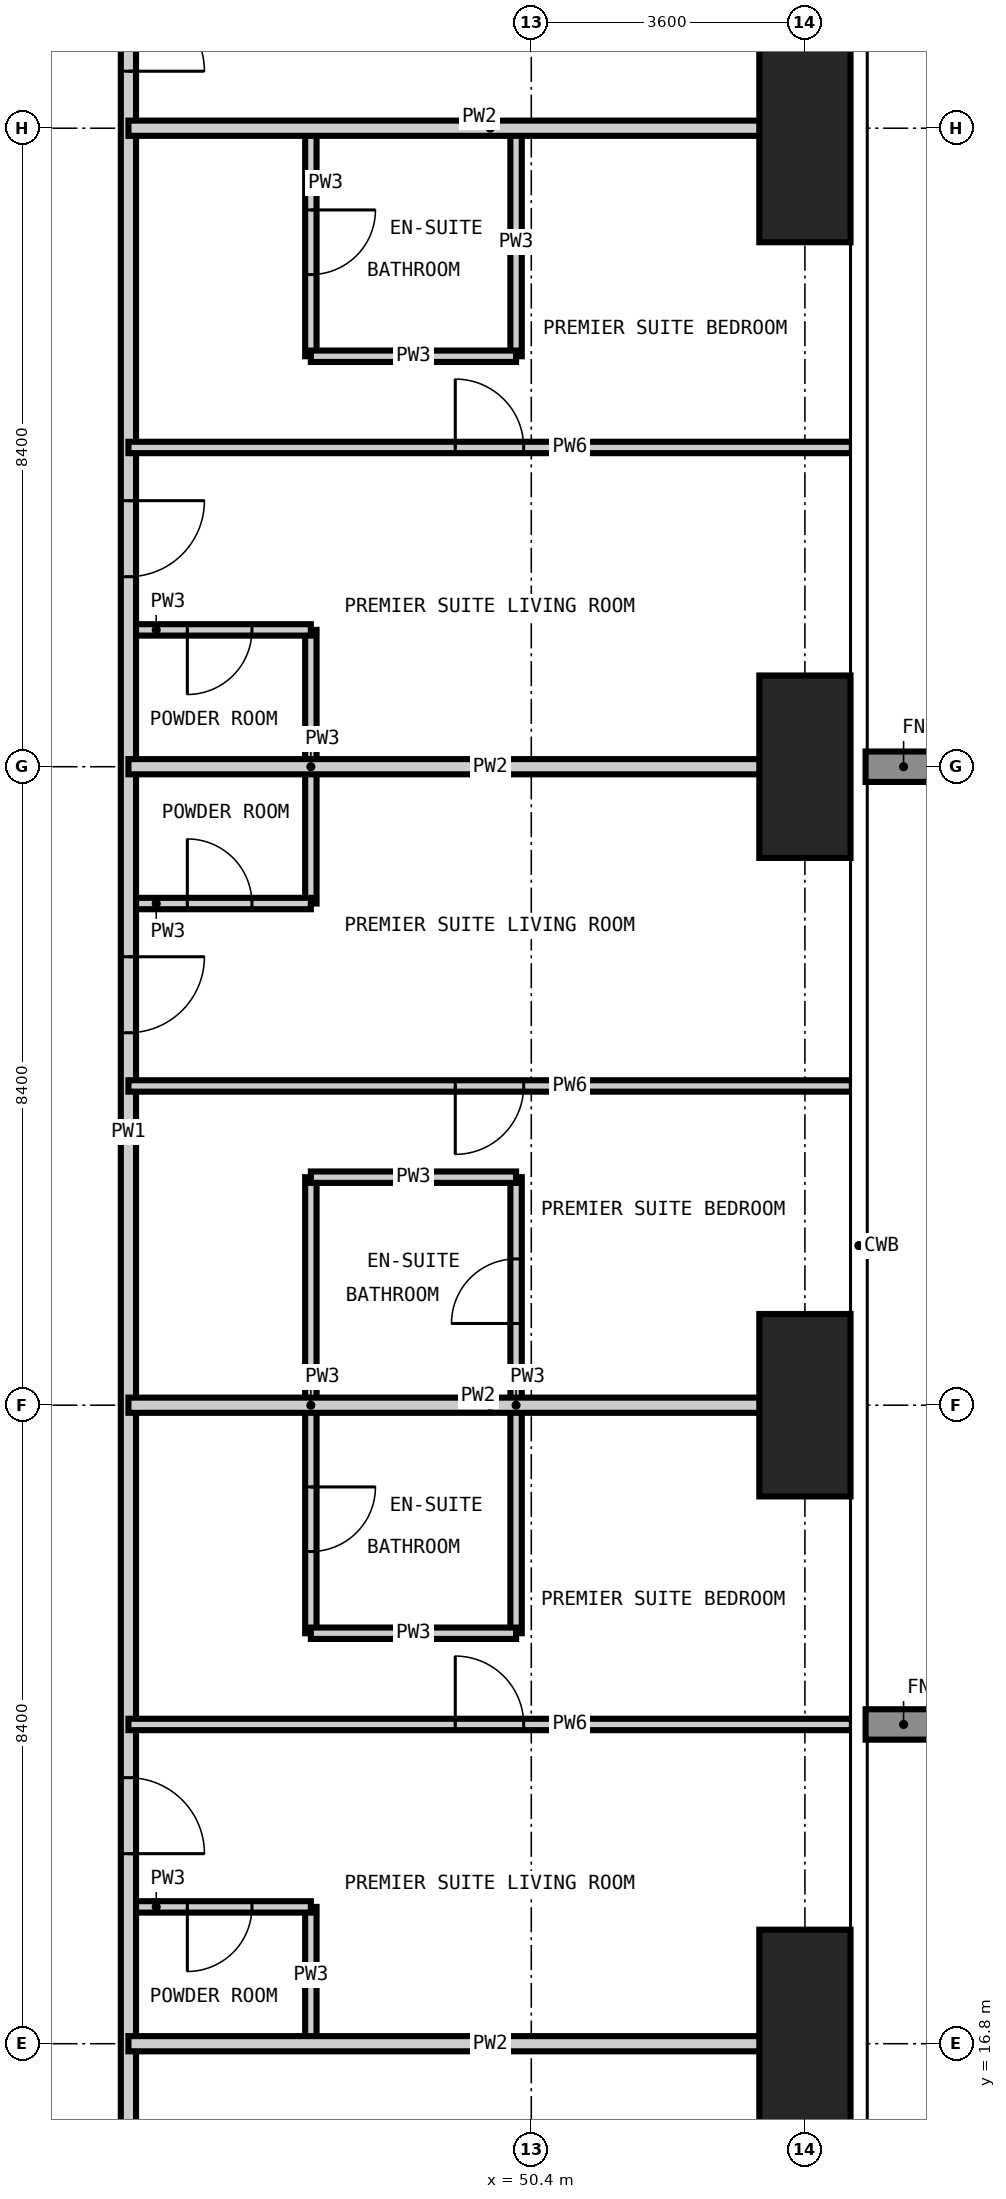
"""IFC4 building model, lengths in metres.
Left out: names, types, materials, properties, quantities, classifications, styles, units other than length and angle.
Written with IfcOpenShell. Run it as: python <this file> out.ifc"""

import sys

from ifc_helpers import new_model, si_unit, direction, frame, frame_2d, origin, origin_2d, place, context, subcontext, project, spatial, rectangle, extrude, element, fill, save


model = new_model("IFC4")
c1 = context("Model", 3, precision=1e-05, world=origin(), true_north=direction((0.0, 1.0)))
c2 = subcontext(c1, "Body", "Model", "MODEL_VIEW")
j1 = project(units=[si_unit("LENGTHUNIT", "METRE"), si_unit("PLANEANGLEUNIT", "RADIAN")], contexts=[c1])
p1 = place(None, origin())
s1 = spatial("IfcSite", under=j1, at=p1, CompositionType="ELEMENT")
p2 = place(p1, origin())
s2 = spatial("IfcBuilding", under=s1, at=p2, CompositionType="ELEMENT")
p3 = place(p2, frame((0.0, 0.0, 144.0)))
s3 = spatial("IfcBuildingStorey", under=s2, at=p3, CompositionType="ELEMENT", Elevation=144.0)
p4 = place(p3, frame((54.0, 16.8, -0.35), z_axis=(0.0, 0.0, 1.0), x_axis=(1.0, 0.0, 0.0)))
e1 = element("IfcColumn", 1, at=p4, inside=s3, PredefinedType="COLUMN", context=c2, shape_type="SweptSolid", body=[
    extrude(rectangle(XDim=1.2, YDim=3.0, at=origin_2d()), origin(), (0.0, 0.0, 1.0), 3.6),
])
for number, where, z_axis, x_axis in (
    (2, (54.0, 25.2, -0.35), (0.0, 0.0, 1.0), (1.0, 0.0, 0.0)),
    (3, (54.0, 33.6, -0.35), (0.0, 0.0, 1.0), (1.0, 0.0, 0.0)),
):
    element("IfcColumn", number, at=place(p3, frame(where, z_axis=z_axis, x_axis=x_axis)), inside=s3, PredefinedType="COLUMN", context=c2, shape_type="SweptSolid", body=[
        extrude(rectangle(XDim=1.2, YDim=2.4, at=origin_2d()), origin(), (0.0, 0.0, 1.0), 3.6),
    ])
p5 = place(p3, frame((54.0, 42.0, -0.35), z_axis=(0.0, 0.0, 1.0), x_axis=(1.0, 0.0, 0.0)))
e4 = element("IfcColumn", 4, at=p5, inside=s3, PredefinedType="COLUMN", context=c2, shape_type="SweptSolid", body=[
    extrude(rectangle(XDim=1.2, YDim=3.0, at=origin_2d()), origin(), (0.0, 0.0, 1.0), 3.6),
])
p6 = place(p3, frame((47.5, 16.8, 0.0), z_axis=(0.0, 0.0, 1.0), x_axis=(0.0, 1.0, 0.0)))
e5 = element("IfcWall", 5, at=p6, inside=s3, PredefinedType="PARTITIONING", context=c2, shape_type="SweptSolid", body=[
    extrude(rectangle(XDim=1.8, YDim=0.15, at=frame_2d((0.9, 0.0))), origin(), (0.0, 0.0, 1.0), 3.25),
])
p7 = place(p3, frame((47.5, 22.2, 0.0), z_axis=(0.0, 0.0, 1.0), x_axis=(0.0, 1.0, 0.0)))
e6 = element("IfcWall", 6, at=p7, inside=s3, PredefinedType="PARTITIONING", context=c2, shape_type="SweptSolid", body=[
    extrude(rectangle(XDim=6.0, YDim=0.15, at=frame_2d((3.0, 0.0))), origin(), (0.0, 0.0, 1.0), 3.25),
])
p8 = place(p7, frame((1.075, 0.0, 0.0)))
e7 = element("IfcOpeningElement", 7, at=p8, cuts=e6, PredefinedType="OPENING", context=c2, shape_type="SweptSolid", body=[
    extrude(rectangle(XDim=0.85, YDim=2.1, at=frame_2d((0.425, 1.05))), frame((0.0, 0.085, 0.0), z_axis=(0.0, -1.0, 0.0), x_axis=(1.0, 0.0, 0.0)), (0.0, 0.0, 1.0), 0.17),
])
p9 = place(p3, frame((47.5, 31.8, 0.0), z_axis=(0.0, 0.0, 1.0), x_axis=(0.0, 1.0, 0.0)))
e8 = element("IfcWall", 8, at=p9, inside=s3, PredefinedType="PARTITIONING", context=c2, shape_type="SweptSolid", body=[
    extrude(rectangle(XDim=3.6, YDim=0.15, at=frame_2d((1.8, 0.0))), origin(), (0.0, 0.0, 1.0), 3.25),
])
p10 = place(p3, frame((47.5, 39.0, 0.0), z_axis=(0.0, 0.0, 1.0), x_axis=(0.0, 1.0, 0.0)))
e9 = element("IfcWall", 9, at=p10, inside=s3, PredefinedType="PARTITIONING", context=c2, shape_type="SweptSolid", body=[
    extrude(rectangle(XDim=3.0, YDim=0.15, at=frame_2d((1.5, 0.0))), origin(), (0.0, 0.0, 1.0), 3.25),
])
p11 = place(p10, frame((1.075, 0.0, 0.0)))
e10 = element("IfcOpeningElement", 10, at=p11, cuts=e9, PredefinedType="OPENING", context=c2, shape_type="SweptSolid", body=[
    extrude(rectangle(XDim=0.85, YDim=2.1, at=frame_2d((0.425, 1.05))), frame((0.0, 0.085, 0.0), z_axis=(0.0, -1.0, 0.0), x_axis=(1.0, 0.0, 0.0)), (0.0, 0.0, 1.0), 0.17),
])
p12 = place(p3, frame((50.2, 22.2, 0.0), z_axis=(0.0, 0.0, 1.0), x_axis=(0.0, 1.0, 0.0)))
e11 = element("IfcWall", 11, at=p12, inside=s3, PredefinedType="PARTITIONING", context=c2, shape_type="SweptSolid", body=[
    extrude(rectangle(XDim=6.0, YDim=0.15, at=frame_2d((3.0, 0.0))), origin(), (0.0, 0.0, 1.0), 3.25),
])
p13 = place(p12, frame((4.075, 0.0, 0.0)))
e12 = element("IfcOpeningElement", 12, at=p13, cuts=e11, PredefinedType="OPENING", context=c2, shape_type="SweptSolid", body=[
    extrude(rectangle(XDim=0.85, YDim=2.1, at=frame_2d((0.425, 1.05))), frame((0.0, 0.085, 0.0), z_axis=(0.0, -1.0, 0.0), x_axis=(1.0, 0.0, 0.0)), (0.0, 0.0, 1.0), 0.17),
])
p14 = place(p3, frame((50.2, 39.0, 0.0), z_axis=(0.0, 0.0, 1.0), x_axis=(0.0, 1.0, 0.0)))
e13 = element("IfcWall", 13, at=p14, inside=s3, PredefinedType="PARTITIONING", context=c2, shape_type="SweptSolid", body=[
    extrude(rectangle(XDim=3.0, YDim=0.15, at=frame_2d((1.5, 0.0))), origin(), (0.0, 0.0, 1.0), 3.25),
])
p15 = place(p3, frame((45.1, 18.6, 0.0), z_axis=(0.0, 0.0, 1.0), x_axis=(1.0, 0.0, 0.0)))
e14 = element("IfcWall", 14, at=p15, inside=s3, PredefinedType="PARTITIONING", context=c2, shape_type="SweptSolid", body=[
    extrude(rectangle(XDim=2.4, YDim=0.15, at=frame_2d((1.2, 0.0))), origin(), (0.0, 0.0, 1.0), 3.25),
])
p16 = place(p15, frame((0.775, 0.0, 0.0)))
e15 = element("IfcOpeningElement", 15, at=p16, cuts=e14, PredefinedType="OPENING", context=c2, shape_type="SweptSolid", body=[
    extrude(rectangle(XDim=0.85, YDim=2.1, at=frame_2d((0.425, 1.05))), frame((0.0, 0.085, 0.0), z_axis=(0.0, -1.0, 0.0), x_axis=(1.0, 0.0, 0.0)), (0.0, 0.0, 1.0), 0.17),
])
for number, where, z_axis, x_axis in (
    (16, (47.5, 22.2, 0.0), (0.0, 0.0, 1.0), (1.0, 0.0, 0.0)),
    (17, (47.5, 28.2, 0.0), (0.0, 0.0, 1.0), (1.0, 0.0, 0.0)),
):
    element("IfcWall", number, at=place(p3, frame(where, z_axis=z_axis, x_axis=x_axis)), inside=s3, PredefinedType="PARTITIONING", context=c2, shape_type="SweptSolid", body=[
        extrude(rectangle(XDim=2.7, YDim=0.15, at=frame_2d((1.35, 0.0))), origin(), (0.0, 0.0, 1.0), 3.25),
    ])
p17 = place(p3, frame((45.1, 31.8, 0.0), z_axis=(0.0, 0.0, 1.0), x_axis=(1.0, 0.0, 0.0)))
e18 = element("IfcWall", 18, at=p17, inside=s3, PredefinedType="PARTITIONING", context=c2, shape_type="SweptSolid", body=[
    extrude(rectangle(XDim=2.4, YDim=0.15, at=frame_2d((1.2, 0.0))), origin(), (0.0, 0.0, 1.0), 3.25),
])
p18 = place(p17, frame((0.775, 0.0, 0.0)))
e19 = element("IfcOpeningElement", 19, at=p18, cuts=e18, PredefinedType="OPENING", context=c2, shape_type="SweptSolid", body=[
    extrude(rectangle(XDim=0.85, YDim=2.1, at=frame_2d((0.425, 1.05))), frame((0.0, 0.085, 0.0), z_axis=(0.0, -1.0, 0.0), x_axis=(1.0, 0.0, 0.0)), (0.0, 0.0, 1.0), 0.17),
])
p19 = place(p3, frame((45.1, 35.4, 0.0), z_axis=(0.0, 0.0, 1.0), x_axis=(1.0, 0.0, 0.0)))
e20 = element("IfcWall", 20, at=p19, inside=s3, PredefinedType="PARTITIONING", context=c2, shape_type="SweptSolid", body=[
    extrude(rectangle(XDim=2.4, YDim=0.15, at=frame_2d((1.2, 0.0))), origin(), (0.0, 0.0, 1.0), 3.25),
])
p20 = place(p19, frame((0.775, 0.0, 0.0)))
e21 = element("IfcOpeningElement", 21, at=p20, cuts=e20, PredefinedType="OPENING", context=c2, shape_type="SweptSolid", body=[
    extrude(rectangle(XDim=0.85, YDim=2.1, at=frame_2d((0.425, 1.05))), frame((0.0, 0.085, 0.0), z_axis=(0.0, -1.0, 0.0), x_axis=(1.0, 0.0, 0.0)), (0.0, 0.0, 1.0), 0.17),
])
p21 = place(p3, frame((47.5, 39.0, 0.0), z_axis=(0.0, 0.0, 1.0), x_axis=(1.0, 0.0, 0.0)))
e22 = element("IfcWall", 22, at=p21, inside=s3, PredefinedType="PARTITIONING", context=c2, shape_type="SweptSolid", body=[
    extrude(rectangle(XDim=2.7, YDim=0.15, at=frame_2d((1.35, 0.0))), origin(), (0.0, 0.0, 1.0), 3.25),
])
p22 = place(p3, frame((45.1, 44.5, 0.0), z_axis=(0.0, 0.0, 1.0), x_axis=(0.0, -1.0, 0.0)))
e23 = element("IfcWall", 23, at=p22, inside=s3, PredefinedType="PARTITIONING", context=c2, shape_type="SweptSolid", body=[
    extrude(rectangle(XDim=31.4, YDim=0.2, at=frame_2d((15.7, 0.0))), origin(), (0.0, 0.0, 1.0), 3.25),
])
p23 = place(p22, frame((24.2, 0.0, 0.0)))
e24 = element("IfcOpeningElement", 24, at=p23, cuts=e23, PredefinedType="OPENING", context=c2, shape_type="SweptSolid", body=[
    extrude(rectangle(XDim=1.0, YDim=2.2, at=frame_2d((0.5, 1.1))), frame((0.0, 0.11, 0.0), z_axis=(0.0, -1.0, 0.0), x_axis=(1.0, 0.0, 0.0)), (0.0, 0.0, 1.0), 0.22),
])
p24 = place(p22, frame((13.4, 0.0, 0.0)))
e25 = element("IfcOpeningElement", 25, at=p24, cuts=e23, PredefinedType="OPENING", context=c2, shape_type="SweptSolid", body=[
    extrude(rectangle(XDim=1.0, YDim=2.2, at=frame_2d((0.5, 1.1))), frame((0.0, 0.11, 0.0), z_axis=(0.0, -1.0, 0.0), x_axis=(1.0, 0.0, 0.0)), (0.0, 0.0, 1.0), 0.22),
])
p25 = place(p22, frame((7.4, 0.0, 0.0)))
e26 = element("IfcOpeningElement", 26, at=p25, cuts=e23, PredefinedType="OPENING", context=c2, shape_type="SweptSolid", body=[
    extrude(rectangle(XDim=1.0, YDim=2.2, at=frame_2d((0.5, 1.1))), frame((0.0, 0.11, 0.0), z_axis=(0.0, -1.0, 0.0), x_axis=(1.0, 0.0, 0.0)), (0.0, 0.0, 1.0), 0.22),
])
p26 = place(p22, frame((29.05, 0.0, 0.0)))
e27 = element("IfcOpeningElement", 27, at=p26, cuts=e23, PredefinedType="OPENING", context=c2, shape_type="SweptSolid", body=[
    extrude(rectangle(XDim=1.0, YDim=2.2, at=frame_2d((0.5, 1.1))), frame((0.0, 0.11, 0.0), z_axis=(0.0, -1.0, 0.0), x_axis=(1.0, 0.0, 0.0)), (0.0, 0.0, 1.0), 0.22),
])
p27 = place(p22, frame((0.75, 0.0, 0.0)))
e28 = element("IfcOpeningElement", 28, at=p27, cuts=e23, PredefinedType="OPENING", context=c2, shape_type="SweptSolid", body=[
    extrude(rectangle(XDim=1.0, YDim=2.2, at=frame_2d((0.5, 1.1))), frame((0.0, 0.11, 0.0), z_axis=(0.0, -1.0, 0.0), x_axis=(1.0, 0.0, 0.0)), (0.0, 0.0, 1.0), 0.22),
])
for number, where, z_axis, x_axis in (
    (29, (45.1, 16.8, 0.0), (0.0, 0.0, 1.0), (1.0, 0.0, 0.0)),
    (30, (45.1, 25.2, 0.0), (0.0, 0.0, 1.0), (1.0, 0.0, 0.0)),
    (31, (45.1, 33.6, 0.0), (0.0, 0.0, 1.0), (1.0, 0.0, 0.0)),
    (32, (45.1, 42.0, 0.0), (0.0, 0.0, 1.0), (1.0, 0.0, 0.0)),
):
    element("IfcWall", number, at=place(p3, frame(where, z_axis=z_axis, x_axis=x_axis)), inside=s3, PredefinedType="PARTITIONING", context=c2, shape_type="SweptSolid", body=[
        extrude(rectangle(XDim=9.518, YDim=0.2, at=frame_2d((4.759, 0.0))), origin(), (0.0, 0.0, 1.0), 3.25),
    ])
p28 = place(p3, frame((45.1, 21.0, 0.0), z_axis=(0.0, 0.0, 1.0), x_axis=(1.0, 0.0, 0.0)))
e33 = element("IfcWall", 33, at=p28, inside=s3, PredefinedType="PARTITIONING", context=c2, shape_type="SweptSolid", body=[
    extrude(rectangle(XDim=9.518, YDim=0.15, at=frame_2d((4.759, 0.0))), origin(), (0.0, 0.0, 1.0), 3.25),
])
p29 = place(p28, frame((4.3, 0.0, 0.0)))
e34 = element("IfcOpeningElement", 34, at=p29, cuts=e33, PredefinedType="OPENING", context=c2, shape_type="SweptSolid", body=[
    extrude(rectangle(XDim=0.9, YDim=2.1, at=frame_2d((0.45, 1.05))), frame((0.0, 0.085, 0.0), z_axis=(0.0, -1.0, 0.0), x_axis=(1.0, 0.0, 0.0)), (0.0, 0.0, 1.0), 0.17),
])
p30 = place(p3, frame((45.1, 29.4, 0.0), z_axis=(0.0, 0.0, 1.0), x_axis=(1.0, 0.0, 0.0)))
e35 = element("IfcWall", 35, at=p30, inside=s3, PredefinedType="PARTITIONING", context=c2, shape_type="SweptSolid", body=[
    extrude(rectangle(XDim=9.518, YDim=0.15, at=frame_2d((4.759, 0.0))), origin(), (0.0, 0.0, 1.0), 3.25),
])
p31 = place(p30, frame((4.3, 0.0, 0.0)))
e36 = element("IfcOpeningElement", 36, at=p31, cuts=e35, PredefinedType="OPENING", context=c2, shape_type="SweptSolid", body=[
    extrude(rectangle(XDim=0.9, YDim=2.1, at=frame_2d((0.45, 1.05))), frame((0.0, 0.085, 0.0), z_axis=(0.0, -1.0, 0.0), x_axis=(1.0, 0.0, 0.0)), (0.0, 0.0, 1.0), 0.17),
])
p32 = place(p3, frame((45.1, 37.8, 0.0), z_axis=(0.0, 0.0, 1.0), x_axis=(1.0, 0.0, 0.0)))
e37 = element("IfcWall", 37, at=p32, inside=s3, PredefinedType="PARTITIONING", context=c2, shape_type="SweptSolid", body=[
    extrude(rectangle(XDim=9.518, YDim=0.15, at=frame_2d((4.759, 0.0))), origin(), (0.0, 0.0, 1.0), 3.25),
])
p33 = place(p32, frame((4.3, 0.0, 0.0)))
e38 = element("IfcOpeningElement", 38, at=p33, cuts=e37, PredefinedType="OPENING", context=c2, shape_type="SweptSolid", body=[
    extrude(rectangle(XDim=0.9, YDim=2.1, at=frame_2d((0.45, 1.05))), frame((0.0, 0.085, 0.0), z_axis=(0.0, -1.0, 0.0), x_axis=(1.0, 0.0, 0.0)), (0.0, 0.0, 1.0), 0.17),
])
p34 = place(p23, origin())
e39 = element("IfcDoor", 39, at=p34, inside=s3, OperationType="SINGLE_SWING_RIGHT", PredefinedType="DOOR", context=c2, shape_type="SweptSolid", body=[
    extrude(rectangle(XDim=1.0, YDim=2.2, at=frame_2d((0.5, 1.1))), frame((0.0, 0.025, 0.0), z_axis=(0.0, -1.0, 0.0), x_axis=(1.0, 0.0, 0.0)), (0.0, 0.0, 1.0), 0.05),
])
fill(e24, e39)
p35 = place(p16, frame((0.85, 0.0, 0.0), z_axis=(0.0, 0.0, 1.0), x_axis=(-1.0, 0.0, 0.0)))
e40 = element("IfcDoor", 40, at=p35, inside=s3, OperationType="SINGLE_SWING_RIGHT", PredefinedType="DOOR", context=c2, shape_type="SweptSolid", body=[
    extrude(rectangle(XDim=0.85, YDim=2.1, at=frame_2d((0.425, 1.05))), frame((0.0, 0.025, 0.0), z_axis=(0.0, -1.0, 0.0), x_axis=(1.0, 0.0, 0.0)), (0.0, 0.0, 1.0), 0.05),
])
fill(e15, e40)
p36 = place(p29, origin())
e41 = element("IfcDoor", 41, at=p36, inside=s3, OperationType="SINGLE_SWING_LEFT", PredefinedType="DOOR", context=c2, shape_type="SweptSolid", body=[
    extrude(rectangle(XDim=0.9, YDim=2.1, at=frame_2d((0.45, 1.05))), frame((0.0, 0.025, 0.0), z_axis=(0.0, -1.0, 0.0), x_axis=(1.0, 0.0, 0.0)), (0.0, 0.0, 1.0), 0.05),
])
fill(e34, e41)
p37 = place(p8, frame((0.85, 0.0, 0.0), z_axis=(0.0, 0.0, 1.0), x_axis=(-1.0, 0.0, 0.0)))
e42 = element("IfcDoor", 42, at=p37, inside=s3, OperationType="SINGLE_SWING_LEFT", PredefinedType="DOOR", context=c2, shape_type="SweptSolid", body=[
    extrude(rectangle(XDim=0.85, YDim=2.1, at=frame_2d((0.425, 1.05))), frame((0.0, 0.025, 0.0), z_axis=(0.0, -1.0, 0.0), x_axis=(1.0, 0.0, 0.0)), (0.0, 0.0, 1.0), 0.05),
])
fill(e7, e42)
p38 = place(p24, origin())
e43 = element("IfcDoor", 43, at=p38, inside=s3, OperationType="SINGLE_SWING_LEFT", PredefinedType="DOOR", context=c2, shape_type="SweptSolid", body=[
    extrude(rectangle(XDim=1.0, YDim=2.2, at=frame_2d((0.5, 1.1))), frame((0.0, 0.025, 0.0), z_axis=(0.0, -1.0, 0.0), x_axis=(1.0, 0.0, 0.0)), (0.0, 0.0, 1.0), 0.05),
])
fill(e25, e43)
p39 = place(p18, origin())
e44 = element("IfcDoor", 44, at=p39, inside=s3, OperationType="SINGLE_SWING_LEFT", PredefinedType="DOOR", context=c2, shape_type="SweptSolid", body=[
    extrude(rectangle(XDim=0.85, YDim=2.1, at=frame_2d((0.425, 1.05))), frame((0.0, 0.025, 0.0), z_axis=(0.0, -1.0, 0.0), x_axis=(1.0, 0.0, 0.0)), (0.0, 0.0, 1.0), 0.05),
])
fill(e19, e44)
p40 = place(p31, frame((0.9, 0.0, 0.0), z_axis=(0.0, 0.0, 1.0), x_axis=(-1.0, 0.0, 0.0)))
e45 = element("IfcDoor", 45, at=p40, inside=s3, OperationType="SINGLE_SWING_RIGHT", PredefinedType="DOOR", context=c2, shape_type="SweptSolid", body=[
    extrude(rectangle(XDim=0.9, YDim=2.1, at=frame_2d((0.45, 1.05))), frame((0.0, 0.025, 0.0), z_axis=(0.0, -1.0, 0.0), x_axis=(1.0, 0.0, 0.0)), (0.0, 0.0, 1.0), 0.05),
])
fill(e36, e45)
p41 = place(p13, origin())
e46 = element("IfcDoor", 46, at=p41, inside=s3, OperationType="SINGLE_SWING_LEFT", PredefinedType="DOOR", context=c2, shape_type="SweptSolid", body=[
    extrude(rectangle(XDim=0.85, YDim=2.1, at=frame_2d((0.425, 1.05))), frame((0.0, 0.025, 0.0), z_axis=(0.0, -1.0, 0.0), x_axis=(1.0, 0.0, 0.0)), (0.0, 0.0, 1.0), 0.05),
])
fill(e12, e46)
p42 = place(p25, origin())
e47 = element("IfcDoor", 47, at=p42, inside=s3, OperationType="SINGLE_SWING_LEFT", PredefinedType="DOOR", context=c2, shape_type="SweptSolid", body=[
    extrude(rectangle(XDim=1.0, YDim=2.2, at=frame_2d((0.5, 1.1))), frame((0.0, 0.025, 0.0), z_axis=(0.0, -1.0, 0.0), x_axis=(1.0, 0.0, 0.0)), (0.0, 0.0, 1.0), 0.05),
])
fill(e26, e47)
p43 = place(p20, frame((0.85, 0.0, 0.0), z_axis=(0.0, 0.0, 1.0), x_axis=(-1.0, 0.0, 0.0)))
e48 = element("IfcDoor", 48, at=p43, inside=s3, OperationType="SINGLE_SWING_RIGHT", PredefinedType="DOOR", context=c2, shape_type="SweptSolid", body=[
    extrude(rectangle(XDim=0.85, YDim=2.1, at=frame_2d((0.425, 1.05))), frame((0.0, 0.025, 0.0), z_axis=(0.0, -1.0, 0.0), x_axis=(1.0, 0.0, 0.0)), (0.0, 0.0, 1.0), 0.05),
])
fill(e21, e48)
p44 = place(p33, origin())
e49 = element("IfcDoor", 49, at=p44, inside=s3, OperationType="SINGLE_SWING_LEFT", PredefinedType="DOOR", context=c2, shape_type="SweptSolid", body=[
    extrude(rectangle(XDim=0.9, YDim=2.1, at=frame_2d((0.45, 1.05))), frame((0.0, 0.025, 0.0), z_axis=(0.0, -1.0, 0.0), x_axis=(1.0, 0.0, 0.0)), (0.0, 0.0, 1.0), 0.05),
])
fill(e38, e49)
p45 = place(p11, frame((0.85, 0.0, 0.0), z_axis=(0.0, 0.0, 1.0), x_axis=(-1.0, 0.0, 0.0)))
e50 = element("IfcDoor", 50, at=p45, inside=s3, OperationType="SINGLE_SWING_LEFT", PredefinedType="DOOR", context=c2, shape_type="SweptSolid", body=[
    extrude(rectangle(XDim=0.85, YDim=2.1, at=frame_2d((0.425, 1.05))), frame((0.0, 0.025, 0.0), z_axis=(0.0, -1.0, 0.0), x_axis=(1.0, 0.0, 0.0)), (0.0, 0.0, 1.0), 0.05),
])
fill(e10, e50)
p46 = place(p27, origin())
e51 = element("IfcDoor", 51, at=p46, inside=s3, OperationType="SINGLE_SWING_RIGHT", PredefinedType="DOOR", context=c2, shape_type="SweptSolid", body=[
    extrude(rectangle(XDim=1.0, YDim=2.2, at=frame_2d((0.5, 1.1))), frame((0.0, 0.025, 0.0), z_axis=(0.0, -1.0, 0.0), x_axis=(1.0, 0.0, 0.0)), (0.0, 0.0, 1.0), 0.05),
])
fill(e28, e51)
save(model, sys.argv[1])
